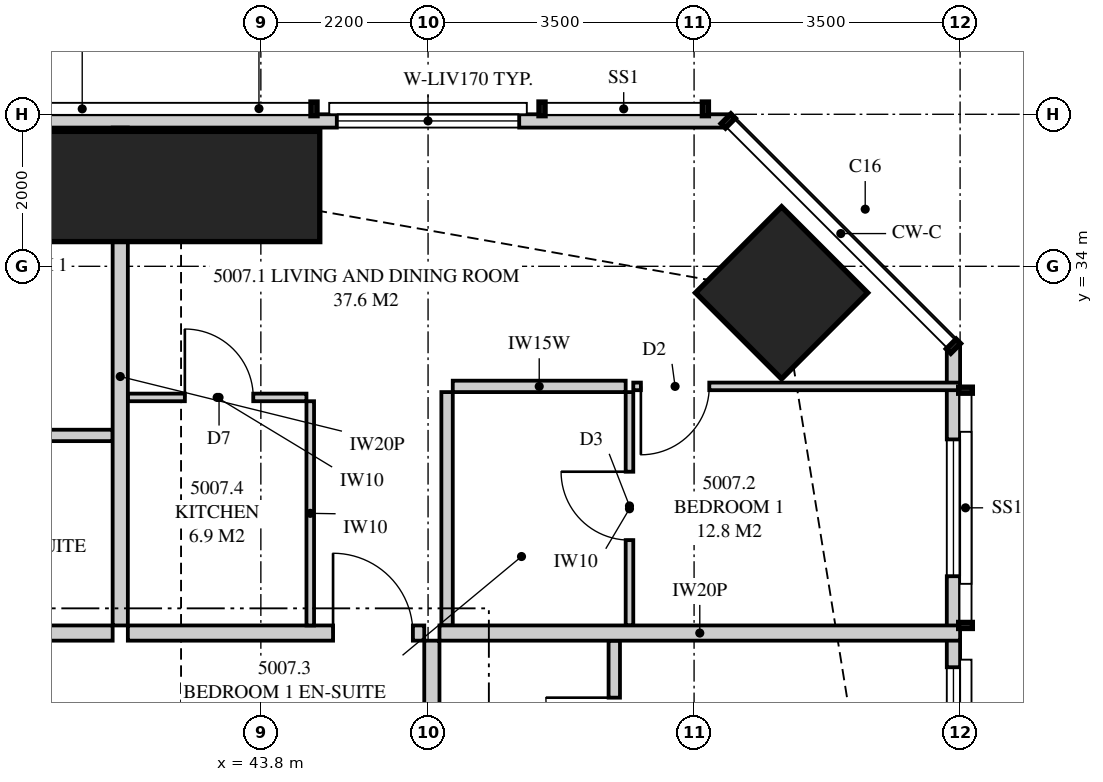
"""IFC4 building model, lengths in metres.
Left out: names, types, materials, properties, quantities, classifications, styles, units other than length and angle.
Written with IfcOpenShell. Run it as: python <this file> out.ifc"""

import sys

from ifc_helpers import new_model, si_unit, direction, frame, frame_2d, origin, origin_2d, place, context, subcontext, project, spatial, polyline, rectangle, outline, extrude, element, fill, save


model = new_model("IFC4")
c1 = context("Model", 3, precision=1e-05, world=origin(), true_north=direction((0.0, 1.0)))
c2 = subcontext(c1, "Body", "Model", "MODEL_VIEW")
j1 = project(units=[si_unit("LENGTHUNIT", "METRE"), si_unit("PLANEANGLEUNIT", "RADIAN")], contexts=[c1])
p1 = place(None, origin())
s1 = spatial("IfcSite", under=j1, at=p1, CompositionType="ELEMENT")
p2 = place(p1, origin())
s2 = spatial("IfcBuilding", under=s1, at=p2, CompositionType="ELEMENT")
p3 = place(p2, frame((0.0, 0.0, 184.5)))
s3 = spatial("IfcBuildingStorey", under=s2, at=p3, CompositionType="ELEMENT", Elevation=184.5)
p4 = place(p3, frame((50.652, 33.652, 0.0), z_axis=(0.0, 0.0, 1.0), x_axis=(0.707106781187, 0.707106781187, 0.0)))
e1 = element("IfcColumn", 1, at=p4, inside=s3, PredefinedType="COLUMN", context=c2, shape_type="SweptSolid", body=[
    extrude(rectangle(XDim=1.6, YDim=1.6, at=origin_2d()), origin(), (0.0, 0.0, 1.0), 3.35),
])
p5 = place(p3, frame((42.75, 35.05, 0.0), z_axis=(0.0, 0.0, 1.0), x_axis=(0.0, 1.0, 0.0)))
e2 = element("IfcColumn", 2, at=p5, inside=s3, PredefinedType="COLUMN", context=c2, shape_type="SweptSolid", body=[
    extrude(rectangle(XDim=1.45, YDim=3.65, at=origin_2d()), origin(), (0.0, 0.0, 1.0), 3.35),
])
p6 = place(p3, frame((52.913, 3.051, 0.0), z_axis=(0.0, 0.0, 1.0), x_axis=(0.0, 1.0, 0.0)))
e3 = element("IfcWall", 3, at=p6, inside=s3, PredefinedType="SOLIDWALL", context=c2, shape_type="SweptSolid", body=[
    extrude(outline(polyline([(0.0, 0.0), (29.897, 0.0), (29.897, 3.11), (22.167, 3.11), (22.167, 2.15), (22.074, 2.15), (22.074, 3.11), (21.949, 3.11), (21.949, 2.15), (9.949, 2.15), (9.949, 3.11), (9.847, 3.11), (9.847, 2.15), (9.706, 2.15), (9.706, 3.11), (0.0, 3.11), (0.0, 0.0)])), frame((0.0, 0.087, 0.0), z_axis=(0.0, -1.0, 0.0), x_axis=(1.0, 0.0, 0.0)), (0.0, 0.0, 1.0), 0.175),
])
p7 = place(p6, frame((1.137, 0.0, 0.4)))
e4 = element("IfcOpeningElement", 4, at=p7, cuts=e3, PredefinedType="OPENING", context=c2, shape_type="SweptSolid", body=[
    extrude(rectangle(XDim=2.4, YDim=1.7, at=frame_2d((1.2, 0.85))), frame((0.0, 0.097, 0.0), z_axis=(0.0, -1.0, 0.0), x_axis=(1.0, 0.0, 0.0)), (0.0, 0.0, 1.0), 0.195),
])
p8 = place(p6, frame((5.674, 0.0, 0.4)))
e5 = element("IfcOpeningElement", 5, at=p8, cuts=e3, PredefinedType="OPENING", context=c2, shape_type="SweptSolid", body=[
    extrude(rectangle(XDim=1.8, YDim=1.7, at=frame_2d((0.9, 0.85))), frame((0.0, 0.097, 0.0), z_axis=(0.0, -1.0, 0.0), x_axis=(1.0, 0.0, 0.0)), (0.0, 0.0, 1.0), 0.195),
])
p9 = place(p6, frame((11.902, 0.0, 0.4)))
e6 = element("IfcOpeningElement", 6, at=p9, cuts=e3, PredefinedType="OPENING", context=c2, shape_type="SweptSolid", body=[
    extrude(rectangle(XDim=2.4, YDim=1.7, at=frame_2d((1.2, 0.85))), frame((0.0, 0.097, 0.0), z_axis=(0.0, -1.0, 0.0), x_axis=(1.0, 0.0, 0.0)), (0.0, 0.0, 1.0), 0.195),
])
p10 = place(p6, frame((15.324, 0.0, 0.0)))
e7 = element("IfcOpeningElement", 7, at=p10, cuts=e3, PredefinedType="OPENING", context=c2, shape_type="SweptSolid", body=[
    extrude(rectangle(XDim=1.8, YDim=2.1, at=frame_2d((0.9, 1.05))), frame((0.0, 0.097, 0.0), z_axis=(0.0, -1.0, 0.0), x_axis=(1.0, 0.0, 0.0)), (0.0, 0.0, 1.0), 0.195),
])
p11 = place(p6, frame((23.874, 0.0, 0.4)))
e8 = element("IfcOpeningElement", 8, at=p11, cuts=e3, PredefinedType="OPENING", context=c2, shape_type="SweptSolid", body=[
    extrude(rectangle(XDim=1.8, YDim=1.7, at=frame_2d((0.9, 0.85))), frame((0.0, 0.097, 0.0), z_axis=(0.0, -1.0, 0.0), x_axis=(1.0, 0.0, 0.0)), (0.0, 0.0, 1.0), 0.195),
])
p12 = place(p6, frame((26.871, 0.0, 0.4)))
e9 = element("IfcOpeningElement", 9, at=p12, cuts=e3, PredefinedType="OPENING", context=c2, shape_type="SweptSolid", body=[
    extrude(rectangle(XDim=1.8, YDim=1.7, at=frame_2d((0.9, 0.85))), frame((0.0, 0.097, 0.0), z_axis=(0.0, -1.0, 0.0), x_axis=(1.0, 0.0, 0.0)), (0.0, 0.0, 1.0), 0.195),
])
p13 = place(p3, frame((49.949, 35.913, 0.0), z_axis=(0.0, 0.0, 1.0), x_axis=(-1.0, 0.0, 0.0)))
e10 = element("IfcWall", 10, at=p13, inside=s3, PredefinedType="SOLIDWALL", context=c2, shape_type="SweptSolid", body=[
    extrude(outline(polyline([(0.0, 0.0), (34.897, 0.0), (34.897, 3.11), (27.91, 3.11), (27.91, 2.15), (27.836, 2.15), (27.836, 3.11), (27.699, 3.11), (27.699, 2.15), (7.199, 2.15), (7.199, 3.11), (7.062, 3.11), (7.062, 2.15), (6.987, 2.15), (6.987, 3.11), (0.0, 3.11), (0.0, 0.0)])), frame((0.0, 0.087, 0.0), z_axis=(0.0, -1.0, 0.0), x_axis=(1.0, 0.0, 0.0)), (0.0, 0.0, 1.0), 0.175),
])
p14 = place(p13, frame((2.75, 0.0, 0.4)))
e11 = element("IfcOpeningElement", 11, at=p14, cuts=e10, PredefinedType="OPENING", context=c2, shape_type="SweptSolid", body=[
    extrude(rectangle(XDim=2.4, YDim=1.7, at=frame_2d((1.2, 0.85))), frame((0.0, 0.097, 0.0), z_axis=(0.0, -1.0, 0.0), x_axis=(1.0, 0.0, 0.0)), (0.0, 0.0, 1.0), 0.195),
])
p15 = place(p13, frame((9.124, 0.0, 0.4)))
e12 = element("IfcOpeningElement", 12, at=p15, cuts=e10, PredefinedType="OPENING", context=c2, shape_type="SweptSolid", body=[
    extrude(rectangle(XDim=1.8, YDim=1.7, at=frame_2d((0.9, 0.85))), frame((0.0, 0.097, 0.0), z_axis=(0.0, -1.0, 0.0), x_axis=(1.0, 0.0, 0.0)), (0.0, 0.0, 1.0), 0.195),
])
p16 = place(p13, frame((13.174, 0.0, 0.0)))
e13 = element("IfcOpeningElement", 13, at=p16, cuts=e10, PredefinedType="OPENING", context=c2, shape_type="SweptSolid", body=[
    extrude(rectangle(XDim=1.8, YDim=2.1, at=frame_2d((0.9, 1.05))), frame((0.0, 0.097, 0.0), z_axis=(0.0, -1.0, 0.0), x_axis=(1.0, 0.0, 0.0)), (0.0, 0.0, 1.0), 0.195),
])
p17 = place(p13, frame((19.849, 0.0, 0.4)))
e14 = element("IfcOpeningElement", 14, at=p17, cuts=e10, PredefinedType="OPENING", context=c2, shape_type="SweptSolid", body=[
    extrude(rectangle(XDim=1.8, YDim=1.7, at=frame_2d((0.9, 0.85))), frame((0.0, 0.097, 0.0), z_axis=(0.0, -1.0, 0.0), x_axis=(1.0, 0.0, 0.0)), (0.0, 0.0, 1.0), 0.195),
])
p18 = place(p13, frame((23.304, 0.0, 0.4)))
e15 = element("IfcOpeningElement", 15, at=p18, cuts=e10, PredefinedType="OPENING", context=c2, shape_type="SweptSolid", body=[
    extrude(rectangle(XDim=2.4, YDim=1.7, at=frame_2d((1.2, 0.85))), frame((0.0, 0.097, 0.0), z_axis=(0.0, -1.0, 0.0), x_axis=(1.0, 0.0, 0.0)), (0.0, 0.0, 1.0), 0.195),
])
p19 = place(p13, frame((30.249, 0.0, 0.4)))
e16 = element("IfcOpeningElement", 16, at=p19, cuts=e10, PredefinedType="OPENING", context=c2, shape_type="SweptSolid", body=[
    extrude(rectangle(XDim=1.8, YDim=1.7, at=frame_2d((0.9, 0.85))), frame((0.0, 0.097, 0.0), z_axis=(0.0, -1.0, 0.0), x_axis=(1.0, 0.0, 0.0)), (0.0, 0.0, 1.0), 0.195),
])
p20 = place(p3, frame((41.95, 35.825, 0.0), z_axis=(0.0, 0.0, 1.0), x_axis=(0.0, -1.0, 0.0)))
e17 = element("IfcWall", 17, at=p20, inside=s3, PredefinedType="PARTITIONING", context=c2, shape_type="SweptSolid", body=[
    extrude(outline(polyline([(0.529, 2.15), (0.0, 2.15), (0.0, 0.0), (0.529, 0.0), (0.529, 0.746), (1.021, 0.746), (1.021, 0.0), (6.55, 0.0), (6.55, 3.11), (1.685, 3.11), (1.685, 2.15), (1.021, 2.15), (1.021, 1.404), (0.529, 1.404), (0.529, 2.15)])), frame((0.0, 0.1, 0.0), z_axis=(0.0, -1.0, 0.0), x_axis=(1.0, 0.0, 0.0)), (0.0, 0.0, 1.0), 0.2),
])
p21 = place(p3, frame((38.4, 31.775, 0.0), z_axis=(0.0, 0.0, 1.0), x_axis=(1.0, 0.0, 0.0)))
e18 = element("IfcWall", 18, at=p21, inside=s3, PredefinedType="PLUMBINGWALL", context=c2, shape_type="SweptSolid", body=[
    extrude(rectangle(XDim=3.45, YDim=0.15, at=frame_2d((1.725, 0.0))), origin(), (0.0, 0.0, 1.0), 3.11),
])
p22 = place(p21, frame((0.4, 0.0, 0.0)))
e19 = element("IfcOpeningElement", 19, at=p22, cuts=e18, PredefinedType="OPENING", context=c2, shape_type="SweptSolid", body=[
    extrude(rectangle(XDim=0.9, YDim=2.1, at=frame_2d((0.45, 1.05))), frame((0.0, 0.085, 0.0), z_axis=(0.0, -1.0, 0.0), x_axis=(1.0, 0.0, 0.0)), (0.0, 0.0, 1.0), 0.17),
])
p23 = place(p3, frame((42.05, 29.175, 0.0), z_axis=(0.0, 0.0, 1.0), x_axis=(1.0, 0.0, 0.0)))
e20 = element("IfcWall", 20, at=p23, inside=s3, PredefinedType="PARTITIONING", context=c2, shape_type="SweptSolid", body=[
    extrude(outline(polyline([(0.0, 0.0), (3.9, 0.0), (3.9, 3.11), (1.037, 3.11), (1.037, 2.541), (0.363, 2.541), (0.363, 3.11), (0.0, 3.11), (0.0, 0.0)])), frame((0.0, 0.1, 0.0), z_axis=(0.0, -1.0, 0.0), x_axis=(1.0, 0.0, 0.0)), (0.0, 0.0, 1.0), 0.2),
])
p24 = place(p23, frame((2.7, 0.0, 0.0)))
e21 = element("IfcOpeningElement", 21, at=p24, cuts=e20, PredefinedType="OPENING", context=c2, shape_type="SweptSolid", body=[
    extrude(rectangle(XDim=1.05, YDim=2.2, at=frame_2d((0.525, 1.1))), frame((0.0, 0.11, 0.0), z_axis=(0.0, -1.0, 0.0), x_axis=(1.0, 0.0, 0.0)), (0.0, 0.0, 1.0), 0.22),
])
p25 = place(p3, frame((48.65, 32.345, 0.0), z_axis=(0.0, 0.0, 1.0), x_axis=(0.0, -1.0, 0.0)))
e22 = element("IfcWall", 22, at=p25, inside=s3, PredefinedType="PARTITIONING", context=c2, shape_type="SweptSolid", body=[
    extrude(rectangle(XDim=3.07, YDim=0.1, at=frame_2d((1.535, 0.0))), origin(), (0.0, 0.0, 1.0), 3.11),
])
p26 = place(p25, frame((1.048, 0.0, 0.0)))
e23 = element("IfcOpeningElement", 23, at=p26, cuts=e22, PredefinedType="OPENING", context=c2, shape_type="SweptSolid", body=[
    extrude(rectangle(XDim=0.9, YDim=2.1, at=frame_2d((0.45, 1.05))), frame((0.0, 0.06, 0.0), z_axis=(0.0, -1.0, 0.0), x_axis=(1.0, 0.0, 0.0)), (0.0, 0.0, 1.0), 0.12),
])
p27 = place(p3, frame((48.7, 32.42, 0.0), z_axis=(0.0, 0.0, 1.0), x_axis=(1.0, 0.0, 0.0)))
e24 = element("IfcWall", 24, at=p27, inside=s3, PredefinedType="PARTITIONING", context=c2, shape_type="SweptSolid", body=[
    extrude(outline(polyline([(0.0, 0.0), (4.3, 0.0), (4.3, 3.11), (3.022, 3.11), (3.022, 2.15), (1.279, 2.15), (1.279, 3.11), (0.0, 3.11), (0.0, 0.0)])), frame((0.0, 0.05, 0.0), z_axis=(0.0, -1.0, 0.0), x_axis=(1.0, 0.0, 0.0)), (0.0, 0.0, 1.0), 0.1),
])
p28 = place(p27, frame((0.1, 0.0, 0.0)))
e25 = element("IfcOpeningElement", 25, at=p28, cuts=e24, PredefinedType="OPENING", context=c2, shape_type="SweptSolid", body=[
    extrude(rectangle(XDim=0.9, YDim=2.1, at=frame_2d((0.45, 1.05))), frame((0.0, 0.06, 0.0), z_axis=(0.0, -1.0, 0.0), x_axis=(1.0, 0.0, 0.0)), (0.0, 0.0, 1.0), 0.12),
])
p29 = place(p3, frame((46.325, 32.42, 0.0), z_axis=(0.0, 0.0, 1.0), x_axis=(1.0, 0.0, 0.0)))
e26 = element("IfcWall", 26, at=p29, inside=s3, PredefinedType="PLUMBINGWALL", context=c2, shape_type="SweptSolid", body=[
    extrude(rectangle(XDim=2.275, YDim=0.15, at=frame_2d((1.138, 0.0))), origin(), (0.0, 0.0, 1.0), 3.11),
])
p30 = place(p3, frame((46.25, 32.345, 0.0), z_axis=(0.0, 0.0, 1.0), x_axis=(0.0, -1.0, 0.0)))
e27 = element("IfcWall", 27, at=p30, inside=s3, PredefinedType="PLUMBINGWALL", context=c2, shape_type="SweptSolid", body=[
    extrude(rectangle(XDim=3.07, YDim=0.15, at=frame_2d((1.535, 0.0))), origin(), (0.0, 0.0, 1.0), 3.11),
])
p31 = place(p3, frame((42.05, 32.275, 0.0), z_axis=(0.0, 0.0, 1.0), x_axis=(1.0, 0.0, 0.0)))
e28 = element("IfcWall", 28, at=p31, inside=s3, PredefinedType="PARTITIONING", context=c2, shape_type="SweptSolid", body=[
    extrude(outline(polyline([(0.0, 0.0), (2.35, 0.0), (2.35, 3.11), (0.987, 3.11), (0.987, 2.541), (0.413, 2.541), (0.413, 3.11), (0.0, 3.11), (0.0, 0.0)])), frame((0.0, 0.05, 0.0), z_axis=(0.0, -1.0, 0.0), x_axis=(1.0, 0.0, 0.0)), (0.0, 0.0, 1.0), 0.1),
])
p32 = place(p31, frame((0.75, 0.0, 0.0)))
e29 = element("IfcOpeningElement", 29, at=p32, cuts=e28, PredefinedType="OPENING", context=c2, shape_type="SweptSolid", body=[
    extrude(rectangle(XDim=0.9, YDim=2.1, at=frame_2d((0.45, 1.05))), frame((0.0, 0.06, 0.0), z_axis=(0.0, -1.0, 0.0), x_axis=(1.0, 0.0, 0.0)), (0.0, 0.0, 1.0), 0.12),
])
p33 = place(p3, frame((44.45, 32.225, 0.0), z_axis=(0.0, 0.0, 1.0), x_axis=(0.0, -1.0, 0.0)))
e30 = element("IfcWall", 30, at=p33, inside=s3, PredefinedType="PARTITIONING", context=c2, shape_type="SweptSolid", body=[
    extrude(rectangle(XDim=2.95, YDim=0.1, at=frame_2d((1.475, 0.0))), origin(), (0.0, 0.0, 1.0), 3.11),
])
p34 = place(p3, frame((46.15, 29.175, 0.0), z_axis=(0.0, 0.0, 1.0), x_axis=(1.0, 0.0, 0.0)))
e31 = element("IfcWall", 31, at=p34, inside=s3, PredefinedType="PARTITIONING", context=c2, shape_type="SweptSolid", body=[
    extrude(outline(polyline([(0.0, 0.0), (6.85, 0.0), (6.85, 3.11), (6.147, 3.11), (6.147, 2.15), (4.303, 2.15), (4.303, 3.11), (0.0, 3.11), (0.0, 0.0)])), frame((0.0, 0.1, 0.0), z_axis=(0.0, -1.0, 0.0), x_axis=(1.0, 0.0, 0.0)), (0.0, 0.0, 1.0), 0.2),
])
p35 = place(p3, frame((48.45, 26.65, 0.0), z_axis=(0.0, 0.0, 1.0), x_axis=(0.0, 1.0, 0.0)))
e32 = element("IfcWall", 32, at=p35, inside=s3, PredefinedType="PLUMBINGWALL", context=c2, shape_type="SweptSolid", body=[
    extrude(rectangle(XDim=2.425, YDim=0.15, at=frame_2d((1.212, 0.0))), origin(), (0.0, 0.0, 1.0), 3.11),
])
p36 = place(p35, frame((0.775, 0.0, 0.0)))
e33 = element("IfcOpeningElement", 33, at=p36, cuts=e32, PredefinedType="OPENING", context=c2, shape_type="SweptSolid", body=[
    extrude(rectangle(XDim=0.9, YDim=2.1, at=frame_2d((0.45, 1.05))), frame((0.0, 0.085, 0.0), z_axis=(0.0, -1.0, 0.0), x_axis=(1.0, 0.0, 0.0)), (0.0, 0.0, 1.0), 0.17),
])
p37 = place(p3, frame((37.875, 29.175, 0.0), z_axis=(0.0, 0.0, 1.0), x_axis=(1.0, 0.0, 0.0)))
e34 = element("IfcWall", 34, at=p37, inside=s3, PredefinedType="PARTITIONING", context=c2, shape_type="SweptSolid", body=[
    extrude(rectangle(XDim=3.975, YDim=0.2, at=frame_2d((1.988, 0.0))), origin(), (0.0, 0.0, 1.0), 3.11),
])
p38 = place(p3, frame((46.05, 26.488, 0.0), z_axis=(0.0, 0.0, 1.0), x_axis=(0.0, 1.0, 0.0)))
e35 = element("IfcWall", 35, at=p38, inside=s3, PredefinedType="PARTITIONING", context=c2, shape_type="SweptSolid", body=[
    extrude(rectangle(XDim=2.587, YDim=0.2, at=frame_2d((1.294, 0.0))), origin(), (0.0, 0.0, 1.0), 3.11),
])
p39 = place(p11, origin())
e36 = element("IfcWindow", 36, at=p39, inside=s3, PartitioningType="SINGLE_PANEL", PredefinedType="WINDOW", context=c2, shape_type="SweptSolid", body=[
    extrude(rectangle(XDim=1.8, YDim=1.7, at=frame_2d((0.9, 0.85))), frame((0.0, 0.03, 0.0), z_axis=(0.0, -1.0, 0.0), x_axis=(1.0, 0.0, 0.0)), (0.0, 0.0, 1.0), 0.06),
])
fill(e8, e36)
p40 = place(p12, origin())
e37 = element("IfcWindow", 37, at=p40, inside=s3, PartitioningType="SINGLE_PANEL", PredefinedType="WINDOW", context=c2, shape_type="SweptSolid", body=[
    extrude(rectangle(XDim=1.8, YDim=1.7, at=frame_2d((0.9, 0.85))), frame((0.0, 0.03, 0.0), z_axis=(0.0, -1.0, 0.0), x_axis=(1.0, 0.0, 0.0)), (0.0, 0.0, 1.0), 0.06),
])
fill(e9, e37)
p41 = place(p14, origin())
e38 = element("IfcWindow", 38, at=p41, inside=s3, PartitioningType="SINGLE_PANEL", PredefinedType="WINDOW", context=c2, shape_type="SweptSolid", body=[
    extrude(rectangle(XDim=2.4, YDim=1.7, at=frame_2d((1.2, 0.85))), frame((0.0, 0.03, 0.0), z_axis=(0.0, -1.0, 0.0), x_axis=(1.0, 0.0, 0.0)), (0.0, 0.0, 1.0), 0.06),
])
fill(e11, e38)
p42 = place(p24, origin())
e39 = element("IfcDoor", 39, at=p42, inside=s3, OperationType="SINGLE_SWING_LEFT", PredefinedType="DOOR", context=c2, shape_type="SweptSolid", body=[
    extrude(rectangle(XDim=1.05, YDim=2.2, at=frame_2d((0.525, 1.1))), frame((0.0, 0.025, 0.0), z_axis=(0.0, -1.0, 0.0), x_axis=(1.0, 0.0, 0.0)), (0.0, 0.0, 1.0), 0.05),
])
fill(e21, e39)
p43 = place(p28, frame((0.9, 0.0, 0.0), z_axis=(0.0, 0.0, 1.0), x_axis=(-1.0, 0.0, 0.0)))
e40 = element("IfcDoor", 40, at=p43, inside=s3, OperationType="SINGLE_SWING_RIGHT", PredefinedType="DOOR", context=c2, shape_type="SweptSolid", body=[
    extrude(rectangle(XDim=0.9, YDim=2.1, at=frame_2d((0.45, 1.05))), frame((0.0, 0.025, 0.0), z_axis=(0.0, -1.0, 0.0), x_axis=(1.0, 0.0, 0.0)), (0.0, 0.0, 1.0), 0.05),
])
fill(e25, e40)
p44 = place(p26, frame((0.9, 0.0, 0.0), z_axis=(0.0, 0.0, 1.0), x_axis=(-1.0, 0.0, 0.0)))
e41 = element("IfcDoor", 41, at=p44, inside=s3, OperationType="SINGLE_SWING_RIGHT", PredefinedType="DOOR", context=c2, shape_type="SweptSolid", body=[
    extrude(rectangle(XDim=0.9, YDim=2.1, at=frame_2d((0.45, 1.05))), frame((0.0, 0.025, 0.0), z_axis=(0.0, -1.0, 0.0), x_axis=(1.0, 0.0, 0.0)), (0.0, 0.0, 1.0), 0.05),
])
fill(e23, e41)
p45 = place(p32, origin())
e42 = element("IfcDoor", 42, at=p45, inside=s3, OperationType="SINGLE_SWING_LEFT", PredefinedType="DOOR", context=c2, shape_type="SweptSolid", body=[
    extrude(rectangle(XDim=0.9, YDim=2.1, at=frame_2d((0.45, 1.05))), frame((0.0, 0.025, 0.0), z_axis=(0.0, -1.0, 0.0), x_axis=(1.0, 0.0, 0.0)), (0.0, 0.0, 1.0), 0.05),
])
fill(e29, e42)
p46 = place(p36, origin())
e43 = element("IfcDoor", 43, at=p46, inside=s3, OperationType="SINGLE_SWING_RIGHT", PredefinedType="DOOR", context=c2, shape_type="SweptSolid", body=[
    extrude(rectangle(XDim=0.9, YDim=2.1, at=frame_2d((0.45, 1.05))), frame((0.0, 0.025, 0.0), z_axis=(0.0, -1.0, 0.0), x_axis=(1.0, 0.0, 0.0)), (0.0, 0.0, 1.0), 0.05),
])
fill(e33, e43)
save(model, sys.argv[1])
